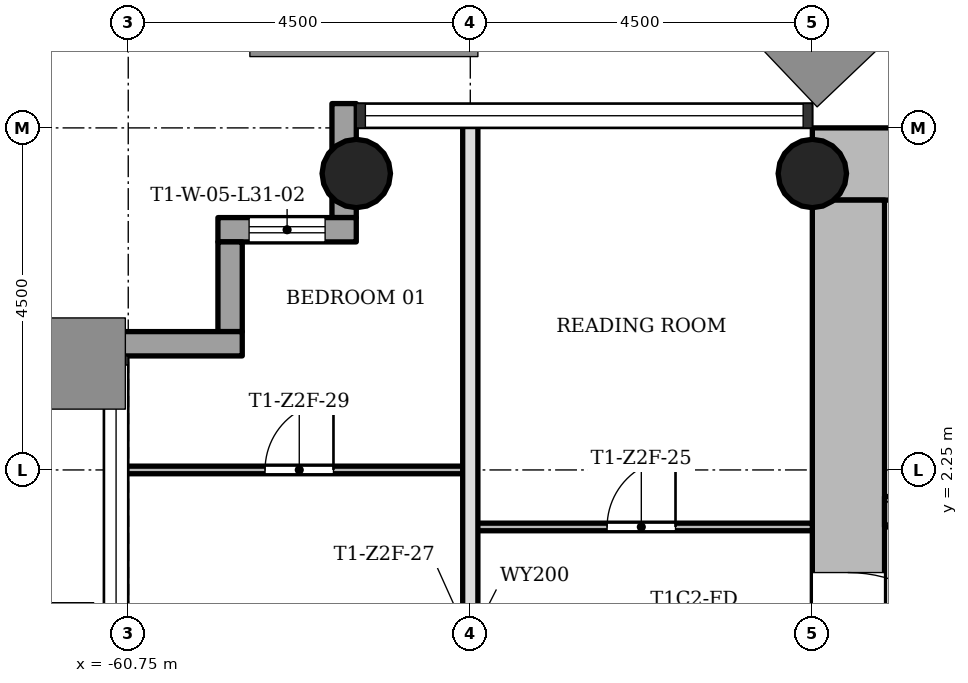
"""IFC4 building model, lengths in metres.
Left out: names, types, materials, properties, quantities, classifications, styles, units other than length and angle.
Written with IfcOpenShell. Run it as: python <this file> out.ifc"""

import sys

from ifc_helpers import new_model, si_unit, direction, frame, frame_2d, origin, origin_2d, place, context, subcontext, project, spatial, rectangle, hollow_circle, extrude, element, fill, save


model = new_model("IFC4")
c1 = context("Model", 3, precision=1e-05, world=origin(), true_north=direction((0.0, 1.0)))
c2 = subcontext(c1, "Body", "Model", "MODEL_VIEW")
j1 = project(units=[si_unit("LENGTHUNIT", "METRE"), si_unit("PLANEANGLEUNIT", "RADIAN")], contexts=[c1])
p1 = place(None, origin())
s1 = spatial("IfcSite", under=j1, at=p1, CompositionType="ELEMENT")
p2 = place(p1, origin())
s2 = spatial("IfcBuilding", under=s1, at=p2, CompositionType="ELEMENT")
p3 = place(p2, frame((0.0, 0.0, 114.0)))
s3 = spatial("IfcBuildingStorey", under=s2, at=p3, CompositionType="ELEMENT", Elevation=114.0)
p4 = place(p3, frame((-43.7, 6.275, 0.0), z_axis=(0.0, 0.0, 1.0), x_axis=(-1.0, 0.0, 0.0)))
e1 = element("IfcWall", 1, at=p4, inside=s3, PredefinedType="SHEAR", context=c2, shape_type="SweptSolid", body=[
    extrude(rectangle(XDim=8.05, YDim=0.95, at=frame_2d((4.025, 0.0))), origin(), (0.0, 0.0, 1.0), 3.4),
])
p5 = place(p3, frame((-51.275, 5.8, 0.0), z_axis=(0.0, 0.0, 1.0), x_axis=(0.0, -1.0, 0.0)))
e2 = element("IfcWall", 2, at=p5, inside=s3, PredefinedType="SHEAR", context=c2, shape_type="SweptSolid", body=[
    extrude(rectangle(XDim=12.55, YDim=0.95, at=frame_2d((6.275, 0.0))), origin(), (0.0, 0.0, 1.0), 3.4),
])
p6 = place(p5, frame((4.9, 0.0, 0.0)))
e3 = element("IfcOpeningElement", 3, at=p6, cuts=e2, PredefinedType="OPENING", context=c2, shape_type="SweptSolid", body=[
    extrude(rectangle(XDim=1.8, YDim=2.1, at=frame_2d((0.9, 1.05))), frame((0.0, 0.485, 0.0), z_axis=(0.0, -1.0, 0.0), x_axis=(1.0, 0.0, 0.0)), (0.0, 0.0, 1.0), 0.97),
])
p7 = place(p3, frame((-50.8, 1.7, 0.0), z_axis=(0.0, 0.0, 1.0), x_axis=(1.0, 0.0, 0.0)))
e4 = element("IfcWall", 4, at=p7, inside=s3, PredefinedType="SHEAR", context=c2, shape_type="SweptSolid", body=[
    extrude(rectangle(XDim=7.1, YDim=0.4, at=frame_2d((3.55, 0.0))), origin(), (0.0, 0.0, 1.0), 3.4),
])
p8 = place(p7, frame((5.2, 0.0, 0.0)))
e5 = element("IfcOpeningElement", 5, at=p8, cuts=e4, PredefinedType="OPENING", context=c2, shape_type="SweptSolid", body=[
    extrude(rectangle(XDim=1.1, YDim=2.1, at=frame_2d((0.55, 1.05))), frame((0.0, 0.21, 0.0), z_axis=(0.0, -1.0, 0.0), x_axis=(1.0, 0.0, 0.0)), (0.0, 0.0, 1.0), 0.42),
])
for number, where, z_axis, x_axis in (
    (6, (-51.75, 6.15, 0.0), (0.0, 0.0, 1.0), (1.0, 0.0, 0.0)),
    (7, (-57.75, 6.15, 0.0), (0.0, 0.0, 1.0), (1.0, 0.0, 0.0)),
):
    element("IfcColumn", number, at=place(p3, frame(where, z_axis=z_axis, x_axis=x_axis)), inside=s3, PredefinedType="COLUMN", context=c2, shape_type="SweptSolid", body=[
        extrude(hollow_circle(Radius=0.45, WallThickness=0.032, at=origin_2d()), origin(), (0.0, 0.0, 1.0), 3.4),
    ])
p9 = place(p3, frame((-57.91, 7.07, -0.3), z_axis=(0.0, 0.0, 1.0), x_axis=(0.0, -1.0, 0.0)))
e8 = element("IfcWall", 8, at=p9, inside=s3, PredefinedType="STANDARD", context=c2, shape_type="SweptSolid", body=[
    extrude(rectangle(XDim=1.5, YDim=0.32, at=frame_2d((0.75, 0.0))), origin(), (0.0, 0.0, 1.0), 3.4),
])
p10 = place(p3, frame((-57.75, 5.41, -0.3), z_axis=(0.0, 0.0, 1.0), x_axis=(-1.0, 0.0, 0.0)))
e9 = element("IfcWall", 9, at=p10, inside=s3, PredefinedType="STANDARD", context=c2, shape_type="SweptSolid", body=[
    extrude(rectangle(XDim=1.82, YDim=0.32, at=frame_2d((0.91, 0.0))), origin(), (0.0, 0.0, 1.0), 3.4),
])
p11 = place(p10, frame((0.41, 0.0, 1.2)))
e10 = element("IfcOpeningElement", 10, at=p11, cuts=e9, PredefinedType="OPENING", context=c2, shape_type="SweptSolid", body=[
    extrude(rectangle(XDim=1.0, YDim=1.5, at=frame_2d((0.5, 0.75))), frame((0.0, 0.17, 0.0), z_axis=(0.0, -1.0, 0.0), x_axis=(1.0, 0.0, 0.0)), (0.0, 0.0, 1.0), 0.34),
])
p12 = place(p3, frame((-59.41, 5.25, -0.3), z_axis=(0.0, 0.0, 1.0), x_axis=(0.0, -1.0, 0.0)))
e11 = element("IfcWall", 11, at=p12, inside=s3, PredefinedType="STANDARD", context=c2, shape_type="SweptSolid", body=[
    extrude(rectangle(XDim=1.18, YDim=0.32, at=frame_2d((0.59, 0.0))), origin(), (0.0, 0.0, 1.0), 3.4),
])
p13 = place(p3, frame((-59.25, 3.91, -0.3), z_axis=(0.0, 0.0, 1.0), x_axis=(-1.0, 0.0, 0.0)))
e12 = element("IfcWall", 12, at=p13, inside=s3, PredefinedType="STANDARD", context=c2, shape_type="SweptSolid", body=[
    extrude(rectangle(XDim=1.82, YDim=0.32, at=frame_2d((0.91, 0.0))), origin(), (0.0, 0.0, 1.0), 3.4),
])
p14 = place(p3, frame((-56.25, -6.85, 0.0), z_axis=(0.0, 0.0, 1.0), x_axis=(0.0, 1.0, 0.0)))
e13 = element("IfcWall", 13, at=p14, inside=s3, PredefinedType="SOLIDWALL", context=c2, shape_type="SweptSolid", body=[
    extrude(rectangle(XDim=13.7, YDim=0.2, at=frame_2d((6.85, 0.0))), origin(), (0.0, 0.0, 1.0), 3.0),
])
p15 = place(p14, frame((6.4, 0.0, 0.0)))
e14 = element("IfcOpeningElement", 14, at=p15, cuts=e13, PredefinedType="OPENING", context=c2, shape_type="SweptSolid", body=[
    extrude(rectangle(XDim=0.9, YDim=2.1, at=frame_2d((0.45, 1.05))), frame((0.0, 0.11, 0.0), z_axis=(0.0, -1.0, 0.0), x_axis=(1.0, 0.0, 0.0)), (0.0, 0.0, 1.0), 0.22),
])
p16 = place(p3, frame((-56.25, 1.5, 0.0), z_axis=(0.0, 0.0, 1.0), x_axis=(1.0, 0.0, 0.0)))
e15 = element("IfcWall", 15, at=p16, inside=s3, PredefinedType="PARTITIONING", context=c2, shape_type="SweptSolid", body=[
    extrude(rectangle(XDim=4.5, YDim=0.1, at=frame_2d((2.25, 0.0))), origin(), (0.0, 0.0, 1.0), 3.0),
])
p17 = place(p16, frame((1.8, 0.0, 0.0)))
e16 = element("IfcOpeningElement", 16, at=p17, cuts=e15, PredefinedType="OPENING", context=c2, shape_type="SweptSolid", body=[
    extrude(rectangle(XDim=0.9, YDim=2.1, at=frame_2d((0.45, 1.05))), frame((0.0, 0.06, 0.0), z_axis=(0.0, -1.0, 0.0), x_axis=(1.0, 0.0, 0.0)), (0.0, 0.0, 1.0), 0.12),
])
p18 = place(p3, frame((-60.85, 2.25, 0.0), z_axis=(0.0, 0.0, 1.0), x_axis=(1.0, 0.0, 0.0)))
e17 = element("IfcWall", 17, at=p18, inside=s3, PredefinedType="PARTITIONING", context=c2, shape_type="SweptSolid", body=[
    extrude(rectangle(XDim=4.6, YDim=0.1, at=frame_2d((2.3, 0.0))), origin(), (0.0, 0.0, 1.0), 3.0),
])
p19 = place(p18, frame((1.9, 0.0, 0.0)))
e18 = element("IfcOpeningElement", 18, at=p19, cuts=e17, PredefinedType="OPENING", context=c2, shape_type="SweptSolid", body=[
    extrude(rectangle(XDim=0.9, YDim=2.1, at=frame_2d((0.45, 1.05))), frame((0.0, 0.06, 0.0), z_axis=(0.0, -1.0, 0.0), x_axis=(1.0, 0.0, 0.0)), (0.0, 0.0, 1.0), 0.12),
])
p20 = place(p17, origin())
e19 = element("IfcDoor", 19, at=p20, inside=s3, OperationType="SINGLE_SWING_LEFT", PredefinedType="DOOR", context=c2, shape_type="SweptSolid", body=[
    extrude(rectangle(XDim=0.9, YDim=2.1, at=frame_2d((0.45, 1.05))), frame((0.0, 0.025, 0.0), z_axis=(0.0, -1.0, 0.0), x_axis=(1.0, 0.0, 0.0)), (0.0, 0.0, 1.0), 0.05),
])
fill(e16, e19)
p21 = place(p19, origin())
e20 = element("IfcDoor", 20, at=p21, inside=s3, OperationType="SINGLE_SWING_LEFT", PredefinedType="DOOR", context=c2, shape_type="SweptSolid", body=[
    extrude(rectangle(XDim=0.9, YDim=2.1, at=frame_2d((0.45, 1.05))), frame((0.0, 0.025, 0.0), z_axis=(0.0, -1.0, 0.0), x_axis=(1.0, 0.0, 0.0)), (0.0, 0.0, 1.0), 0.05),
])
fill(e18, e20)
p22 = place(p6, origin())
e21 = element("IfcDoor", 21, at=p22, inside=s3, OperationType="SINGLE_SWING_LEFT", PredefinedType="DOOR", context=c2, shape_type="SweptSolid", body=[
    extrude(rectangle(XDim=1.8, YDim=2.1, at=frame_2d((0.9, 1.05))), frame((0.0, 0.025, 0.0), z_axis=(0.0, -1.0, 0.0), x_axis=(1.0, 0.0, 0.0)), (0.0, 0.0, 1.0), 0.05),
])
fill(e3, e21)
p23 = place(p11, origin())
e22 = element("IfcWindow", 22, at=p23, inside=s3, PartitioningType="SINGLE_PANEL", PredefinedType="WINDOW", context=c2, shape_type="SweptSolid", body=[
    extrude(rectangle(XDim=1.0, YDim=1.5, at=frame_2d((0.5, 0.75))), frame((0.0, 0.03, 0.0), z_axis=(0.0, -1.0, 0.0), x_axis=(1.0, 0.0, 0.0)), (0.0, 0.0, 1.0), 0.06),
])
fill(e10, e22)
save(model, sys.argv[1])
